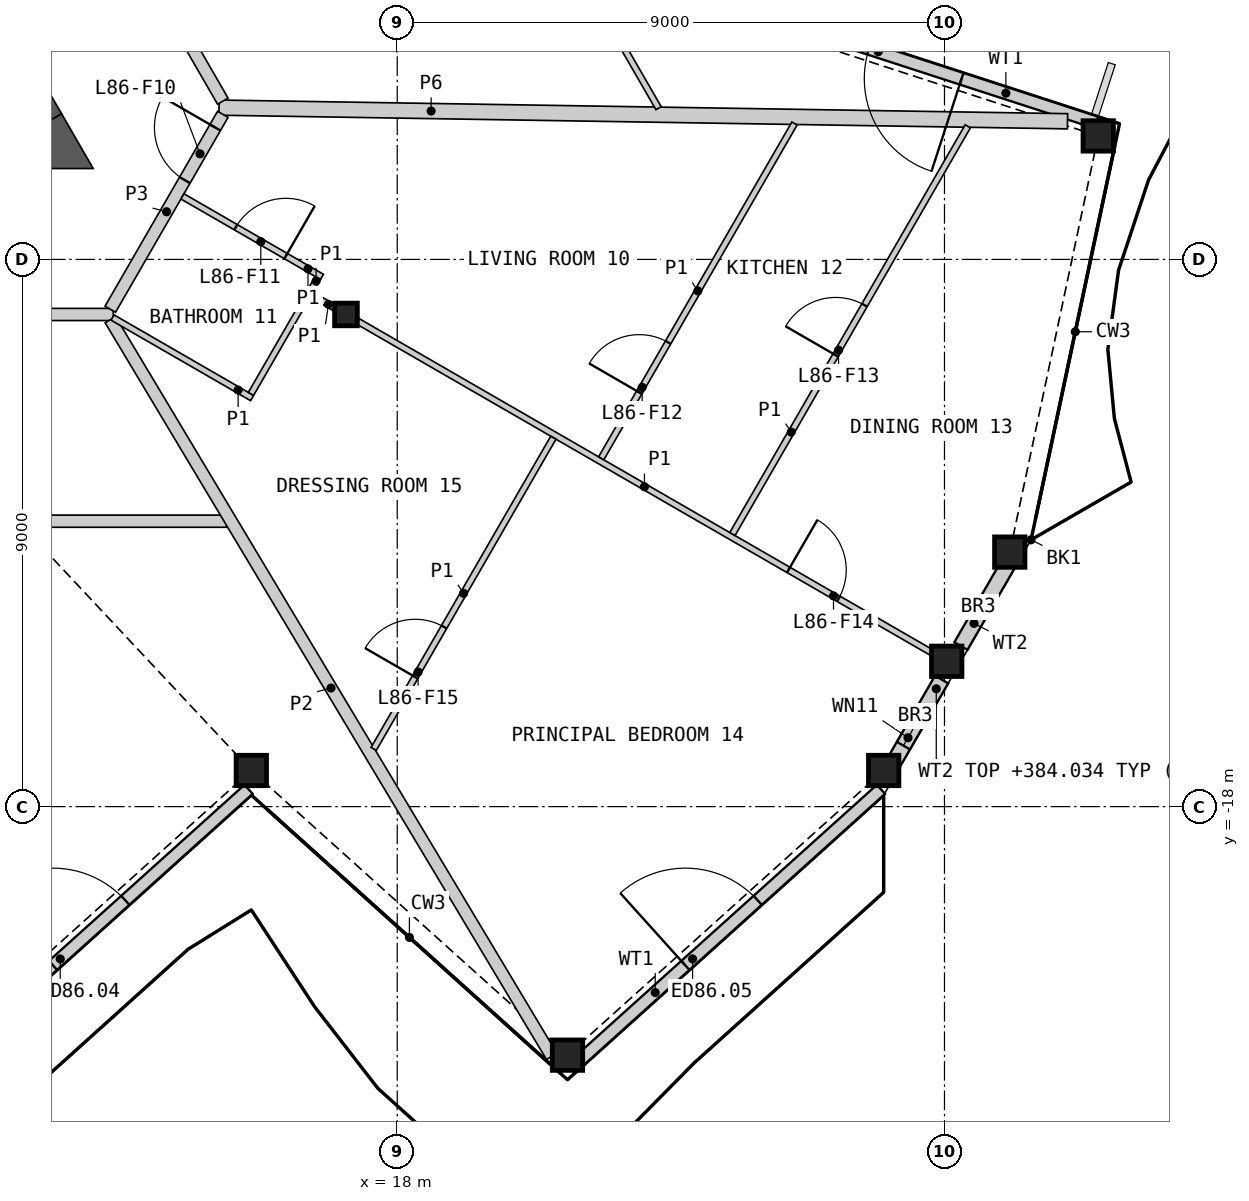
"""IFC4 building model, lengths in metres.
Left out: names, types, materials, properties, quantities, classifications, styles, units other than length and angle.
Written with IfcOpenShell. Run it as: python <this file> out.ifc"""

import sys

from ifc_helpers import new_model, si_unit, direction, frame, frame_2d, origin, origin_2d, place, context, subcontext, project, spatial, polyline, rectangle, hollow_rectangle, i_section, outline, extrude, element, fill, save


model = new_model("IFC4")
c1 = context("Model", 3, precision=1e-05, world=origin(), true_north=direction((0.0, 1.0)))
c2 = subcontext(c1, "Body", "Model", "MODEL_VIEW")
j1 = project(units=[si_unit("LENGTHUNIT", "METRE"), si_unit("PLANEANGLEUNIT", "RADIAN")], contexts=[c1])
p1 = place(None, origin())
s1 = spatial("IfcSite", under=j1, at=p1, CompositionType="ELEMENT")
p2 = place(p1, origin())
s2 = spatial("IfcBuilding", under=s1, at=p2, CompositionType="ELEMENT")
p3 = place(p2, frame((0.0, 0.0, 381.4)))
s3 = spatial("IfcBuildingStorey", under=s2, at=p3, CompositionType="ELEMENT", Elevation=381.4)
for number, where, z_axis, x_axis in (
    (1, (15.6, -17.406, 0.0), (0.0, 0.0, 1.0), (1.0, 0.0, 0.0)),
    (2, (20.8, -22.088, 0.0), (0.0, 0.0, 1.0), (1.0, 0.0, 0.0)),
    (3, (26.0, -17.406, 0.0), (0.0, 0.0, 1.0), (1.0, 0.0, 0.0)),
    (4, (27.037, -15.61, 0.0), (0.0, 0.0, 1.0), (1.0, 0.0, 0.0)),
    (5, (28.074, -13.814, 0.0), (0.0, 0.0, 1.0), (1.0, 0.0, 0.0)),
    (6, (29.529, -6.969, 0.0), (0.0, 0.0, 1.0), (1.0, 0.0, 0.0)),
):
    element("IfcColumn", number, at=place(p3, frame(where, z_axis=z_axis, x_axis=x_axis)), inside=s3, PredefinedType="COLUMN", context=c2, shape_type="SweptSolid", body=[
        extrude(hollow_rectangle(XDim=0.5, YDim=0.5, WallThickness=0.03, at=origin_2d()), origin(), (0.0, 0.0, 1.0), 3.4),
    ])
p4 = place(p3, frame((17.157, -9.906, 0.0), z_axis=(0.0, 0.0, 1.0), x_axis=(1.0, 0.0, 0.0)))
e7 = element("IfcColumn", 7, at=p4, inside=s3, PredefinedType="COLUMN", context=c2, shape_type="SweptSolid", body=[
    extrude(i_section(OverallWidth=0.374, OverallDepth=0.372, WebThickness=0.016, FlangeThickness=0.026, at=origin_2d()), origin(), (0.0, 0.0, 1.0), 3.4),
])
p5 = place(p3, frame((10.605, -22.173, 0.0), z_axis=(0.0, 0.0, 1.0), x_axis=(0.743135582201, 0.669140871915, 0.0)))
e8 = element("IfcWall", 8, at=p5, inside=s3, PredefinedType="SOLIDWALL", context=c2, shape_type="SweptSolid", body=[
    extrude(rectangle(XDim=6.662, YDim=0.2, at=frame_2d((3.331, 0.0))), origin(), (0.0, 0.0, 1.0), 2.634),
])
p6 = place(p5, frame((2.333, 0.0, 0.0)))
e9 = element("IfcOpeningElement", 9, at=p6, cuts=e8, PredefinedType="OPENING", context=c2, shape_type="SweptSolid", body=[
    extrude(rectangle(XDim=1.6, YDim=2.25, at=frame_2d((0.8, 1.125))), frame((0.0, 0.11, 0.0), z_axis=(0.0, -1.0, 0.0), x_axis=(1.0, 0.0, 0.0)), (0.0, 0.0, 1.0), 0.22),
])
p7 = place(p3, frame((21.005, -22.173, 0.0), z_axis=(0.0, 0.0, 1.0), x_axis=(0.743135582201, 0.669140871915, 0.0)))
e10 = element("IfcWall", 10, at=p7, inside=s3, PredefinedType="SOLIDWALL", context=c2, shape_type="SweptSolid", body=[
    extrude(rectangle(XDim=6.662, YDim=0.2, at=frame_2d((3.331, 0.0))), origin(), (0.0, 0.0, 1.0), 2.634),
])
p8 = place(p7, frame((2.333, 0.0, 0.0)))
e11 = element("IfcOpeningElement", 11, at=p8, cuts=e10, PredefinedType="OPENING", context=c2, shape_type="SweptSolid", body=[
    extrude(rectangle(XDim=1.6, YDim=2.25, at=frame_2d((0.8, 1.125))), frame((0.0, 0.11, 0.0), z_axis=(0.0, -1.0, 0.0), x_axis=(1.0, 0.0, 0.0)), (0.0, 0.0, 1.0), 0.22),
])
p9 = place(p3, frame((26.075, -17.43, 0.0), z_axis=(0.0, 0.0, 1.0), x_axis=(0.500027377864, 0.86600959659, 0.0)))
e12 = element("IfcWall", 12, at=p9, inside=s3, PredefinedType="SOLIDWALL", context=c2, shape_type="SweptSolid", body=[
    extrude(rectangle(XDim=1.756, YDim=0.25, at=frame_2d((0.878, 0.0))), origin(), (0.0, 0.0, 1.0), 2.634),
])
p10 = place(p9, frame((0.5, 0.0, 1.7)))
e13 = element("IfcOpeningElement", 13, at=p10, cuts=e12, PredefinedType="OPENING", context=c2, shape_type="SweptSolid", body=[
    extrude(rectangle(XDim=0.6, YDim=0.7, at=frame_2d((0.3, 0.35))), frame((0.0, 0.135, 0.0), z_axis=(0.0, -1.0, 0.0), x_axis=(1.0, 0.0, 0.0)), (0.0, 0.0, 1.0), 0.27),
])
p11 = place(p3, frame((27.27, -15.36, 0.0), z_axis=(0.0, 0.0, 1.0), x_axis=(0.499975693202, 0.866039436866, 0.0)))
e14 = element("IfcWall", 14, at=p11, inside=s3, PredefinedType="SOLIDWALL", context=c2, shape_type="SweptSolid", body=[
    extrude(rectangle(XDim=1.725, YDim=0.25, at=frame_2d((0.862, 0.0))), origin(), (0.0, 0.0, 1.0), 2.634),
])
p12 = place(p3, frame((29.5, -6.75, 0.0), z_axis=(0.0, 0.0, 1.0), x_axis=(-0.951060123915, 0.309005891041, 0.0)))
e15 = element("IfcWall", 15, at=p12, inside=s3, PredefinedType="SOLIDWALL", context=c2, shape_type="SweptSolid", body=[
    extrude(rectangle(XDim=6.265, YDim=0.2, at=frame_2d((3.133, 0.0))), origin(), (0.0, 0.0, 1.0), 2.634),
])
p13 = place(p12, frame((2.333, 0.0, 0.0)))
e16 = element("IfcOpeningElement", 16, at=p13, cuts=e15, PredefinedType="OPENING", context=c2, shape_type="SweptSolid", body=[
    extrude(rectangle(XDim=1.6, YDim=2.25, at=frame_2d((0.8, 1.125))), frame((0.0, 0.11, 0.0), z_axis=(0.0, -1.0, 0.0), x_axis=(1.0, 0.0, 0.0)), (0.0, 0.0, 1.0), 0.22),
])
p14 = place(p3, frame((12.221, -6.756, 0.0), z_axis=(0.0, 0.0, 1.0), x_axis=(-0.500020646047, 0.866013483456, 0.0)))
e17 = element("IfcWall", 17, at=p14, inside=s3, PredefinedType="SHEAR", context=c2, shape_type="SweptSolid", body=[
    extrude(rectangle(XDim=4.559, YDim=0.6, at=frame_2d((2.28, 0.0))), origin(), (0.0, 0.0, 1.0), 3.1),
])
p15 = place(p3, origin())
e18 = element("IfcWall", 18, at=p15, inside=s3, PredefinedType="SHEAR", context=c2, shape_type="SweptSolid", body=[
    extrude(outline(polyline([(11.961, -7.506), (11.961, -6.906), (12.48, -6.606), (13.0, -7.506), (11.961, -7.506)])), origin(), (0.0, 0.0, 1.0), 3.1),
])
p16 = place(p3, frame((15.069, -6.503, 0.0), z_axis=(0.0, 0.0, 1.0), x_axis=(0.999870484296, -0.016093931549, 0.0)))
e19 = element("IfcWall", 19, at=p16, inside=s3, PredefinedType="PARTITIONING", context=c2, shape_type="SweptSolid", body=[
    extrude(rectangle(XDim=13.956, YDim=0.25, at=frame_2d((6.978, 0.0))), origin(), (0.0, 0.0, 1.0), 2.33),
])
p17 = place(p3, frame((8.775, -9.906, 0.0), z_axis=(0.0, 0.0, 1.0), x_axis=(1.0, 0.0, 0.0)))
e20 = element("IfcWall", 20, at=p17, inside=s3, PredefinedType="PARTITIONING", context=c2, shape_type="SweptSolid", body=[
    extrude(rectangle(XDim=4.555, YDim=0.2, at=frame_2d((2.278, 0.0))), origin(), (0.0, 0.0, 1.0), 3.1),
])
p18 = place(p3, frame((12.981, -2.673, 0.0), z_axis=(0.0, 0.0, 1.0), x_axis=(0.499986217557, -0.866033360935, 0.0)))
e21 = element("IfcWall", 21, at=p18, inside=s3, PredefinedType="PARTITIONING", context=c2, shape_type="SweptSolid", body=[
    extrude(rectangle(XDim=4.3, YDim=0.2, at=frame_2d((2.15, 0.0))), origin(), (0.0, 0.0, 1.0), 3.1),
])
p19 = place(p3, frame((13.281, -9.819, 0.0), z_axis=(0.0, 0.0, 1.0), x_axis=(0.499948957823, 0.866054870994, 0.0)))
e22 = element("IfcWall", 22, at=p19, inside=s3, PredefinedType="PARTITIONING", context=c2, shape_type="SweptSolid", body=[
    extrude(rectangle(XDim=3.701, YDim=0.2, at=frame_2d((1.851, 0.0))), origin(), (0.0, 0.0, 1.0), 3.1),
])
p20 = place(p19, frame((2.451, 0.0, 0.0)))
e23 = element("IfcOpeningElement", 23, at=p20, cuts=e22, PredefinedType="OPENING", context=c2, shape_type="SweptSolid", body=[
    extrude(rectangle(XDim=1.0, YDim=2.1, at=frame_2d((0.5, 1.05))), frame((0.0, 0.11, 0.0), z_axis=(0.0, -1.0, 0.0), x_axis=(1.0, 0.0, 0.0)), (0.0, 0.0, 1.0), 0.22),
])
p21 = place(p3, frame((0.1, -13.306, 0.0), z_axis=(0.0, 0.0, 1.0), x_axis=(1.0, 0.0, 0.0)))
e24 = element("IfcWall", 24, at=p21, inside=s3, PredefinedType="PARTITIONING", context=c2, shape_type="SweptSolid", body=[
    extrude(rectangle(XDim=15.094, YDim=0.2, at=frame_2d((7.547, 0.0))), origin(), (0.0, 0.0, 1.0), 2.33),
])
p22 = place(p21, frame((9.781, 0.0, 0.0)))
e25 = element("IfcOpeningElement", 25, at=p22, cuts=e24, PredefinedType="OPENING", context=c2, shape_type="SweptSolid", body=[
    extrude(rectangle(XDim=0.95, YDim=2.1, at=frame_2d((0.475, 1.05))), frame((0.0, 0.11, 0.0), z_axis=(0.0, -1.0, 0.0), x_axis=(1.0, 0.0, 0.0)), (0.0, 0.0, 1.0), 0.22),
])
p23 = place(p3, frame((13.282, -9.991, 0.0), z_axis=(0.0, 0.0, 1.0), x_axis=(0.513867741763, -0.857869421285, 0.0)))
e26 = element("IfcWall", 26, at=p23, inside=s3, PredefinedType="PARTITIONING", context=c2, shape_type="SweptSolid", body=[
    extrude(rectangle(XDim=14.124, YDim=0.2, at=frame_2d((7.062, 0.0))), origin(), (0.0, 0.0, 1.0), 2.33),
])
p24 = place(p3, frame((17.354, -10.019, 0.0), z_axis=(0.0, 0.0, 1.0), x_axis=(0.866019680922, -0.500009912158, 0.0)))
e27 = element("IfcWall", 27, at=p24, inside=s3, PredefinedType="PARTITIONING", context=c2, shape_type="SweptSolid", body=[
    extrude(rectangle(XDim=10.881, YDim=0.1, at=frame_2d((5.44, 0.0))), origin(), (0.0, 0.0, 1.0), 2.33),
])
p25 = place(p24, frame((8.176, 0.0, 0.0)))
e28 = element("IfcOpeningElement", 28, at=p25, cuts=e27, PredefinedType="OPENING", context=c2, shape_type="SweptSolid", body=[
    extrude(rectangle(XDim=0.95, YDim=2.1, at=frame_2d((0.475, 1.05))), frame((0.0, 0.06, 0.0), z_axis=(0.0, -1.0, 0.0), x_axis=(1.0, 0.0, 0.0)), (0.0, 0.0, 1.0), 0.12),
])
p26 = place(p3, frame((23.512, -13.517, 0.0), z_axis=(0.0, 0.0, 1.0), x_axis=(0.49998445949, 0.866034375916, 0.0)))
e29 = element("IfcWall", 29, at=p26, inside=s3, PredefinedType="PARTITIONING", context=c2, shape_type="SweptSolid", body=[
    extrude(rectangle(XDim=7.743, YDim=0.1, at=frame_2d((3.872, 0.0))), origin(), (0.0, 0.0, 1.0), 2.33),
])
p27 = place(p26, frame((3.397, 0.0, 0.0)))
e30 = element("IfcOpeningElement", 30, at=p27, cuts=e29, PredefinedType="OPENING", context=c2, shape_type="SweptSolid", body=[
    extrude(rectangle(XDim=0.95, YDim=2.1, at=frame_2d((0.475, 1.05))), frame((0.0, 0.06, 0.0), z_axis=(0.0, -1.0, 0.0), x_axis=(1.0, 0.0, 0.0)), (0.0, 0.0, 1.0), 0.12),
])
p28 = place(p3, frame((21.354, -12.271, 0.0), z_axis=(0.0, 0.0, 1.0), x_axis=(0.499983931063, 0.866034680991, 0.0)))
e31 = element("IfcWall", 31, at=p28, inside=s3, PredefinedType="PARTITIONING", context=c2, shape_type="SweptSolid", body=[
    extrude(rectangle(XDim=6.358, YDim=0.1, at=frame_2d((3.179, 0.0))), origin(), (0.0, 0.0, 1.0), 2.33),
])
p29 = place(p28, frame((1.252, 0.0, 0.0)))
e32 = element("IfcOpeningElement", 32, at=p29, cuts=e31, PredefinedType="OPENING", context=c2, shape_type="SweptSolid", body=[
    extrude(rectangle(XDim=0.95, YDim=2.1, at=frame_2d((0.475, 1.05))), frame((0.0, 0.06, 0.0), z_axis=(0.0, -1.0, 0.0), x_axis=(1.0, 0.0, 0.0)), (0.0, 0.0, 1.0), 0.12),
])
p30 = place(p3, frame((19.128, -1.023, 0.0), z_axis=(0.0, 0.0, 1.0), x_axis=(0.499991387631, -0.866030376081, 0.0)))
e33 = element("IfcWall", 33, at=p30, inside=s3, PredefinedType="PARTITIONING", context=c2, shape_type="SweptSolid", body=[
    extrude(rectangle(XDim=6.339, YDim=0.1, at=frame_2d((3.169, 0.0))), origin(), (0.0, 0.0, 1.0), 2.33),
])
p31 = place(p30, frame((2.389, 0.0, 0.0)))
e34 = element("IfcOpeningElement", 34, at=p31, cuts=e33, PredefinedType="OPENING", context=c2, shape_type="SweptSolid", body=[
    extrude(rectangle(XDim=0.95, YDim=2.1, at=frame_2d((0.475, 1.05))), frame((0.0, 0.06, 0.0), z_axis=(0.0, -1.0, 0.0), x_axis=(1.0, 0.0, 0.0)), (0.0, 0.0, 1.0), 0.12),
])
p32 = place(p3, frame((17.613, -17.051, 0.0), z_axis=(0.0, 0.0, 1.0), x_axis=(0.499982307286, 0.866035618437, 0.0)))
e35 = element("IfcWall", 35, at=p32, inside=s3, PredefinedType="PARTITIONING", context=c2, shape_type="SweptSolid", body=[
    extrude(rectangle(XDim=5.91, YDim=0.1, at=frame_2d((2.955, 0.0))), origin(), (0.0, 0.0, 1.0), 2.33),
])
p33 = place(p32, frame((1.365, 0.0, 0.0)))
e36 = element("IfcOpeningElement", 36, at=p33, cuts=e35, PredefinedType="OPENING", context=c2, shape_type="SweptSolid", body=[
    extrude(rectangle(XDim=0.95, YDim=2.1, at=frame_2d((0.475, 1.05))), frame((0.0, 0.06, 0.0), z_axis=(0.0, -1.0, 0.0), x_axis=(1.0, 0.0, 0.0)), (0.0, 0.0, 1.0), 0.12),
])
p34 = place(p3, frame((13.317, -9.956, 0.0), z_axis=(0.0, 0.0, 1.0), x_axis=(0.866052124492, -0.499953715521, 0.0)))
e37 = element("IfcWall", 37, at=p34, inside=s3, PredefinedType="PARTITIONING", context=c2, shape_type="SweptSolid", body=[
    extrude(rectangle(XDim=2.65, YDim=0.1, at=frame_2d((1.325, 0.0))), origin(), (0.0, 0.0, 1.0), 2.33),
])
p35 = place(p3, frame((14.468, -7.964, 0.0), z_axis=(0.0, 0.0, 1.0), x_axis=(0.86603978909, -0.499975083092, 0.0)))
e38 = element("IfcWall", 38, at=p35, inside=s3, PredefinedType="PARTITIONING", context=c2, shape_type="SweptSolid", body=[
    extrude(rectangle(XDim=2.649, YDim=0.1, at=frame_2d((1.325, 0.0))), origin(), (0.0, 0.0, 1.0), 2.33),
])
p36 = place(p35, frame((1.013, 0.0, 0.0)))
e39 = element("IfcOpeningElement", 39, at=p36, cuts=e38, PredefinedType="OPENING", context=c2, shape_type="SweptSolid", body=[
    extrude(rectangle(XDim=0.95, YDim=2.1, at=frame_2d((0.475, 1.05))), frame((0.0, 0.06, 0.0), z_axis=(0.0, -1.0, 0.0), x_axis=(1.0, 0.0, 0.0)), (0.0, 0.0, 1.0), 0.12),
])
p37 = place(p3, frame((15.594, -11.212, 0.0), z_axis=(0.0, 0.0, 1.0), x_axis=(0.500011643316, 0.866018681408, 0.0)))
e40 = element("IfcWall", 40, at=p37, inside=s3, PredefinedType="PARTITIONING", context=c2, shape_type="SweptSolid", body=[
    extrude(rectangle(XDim=1.973, YDim=0.1, at=frame_2d((0.987, 0.0))), origin(), (0.0, 0.0, 1.0), 2.33),
])
p38 = place(p3, frame((16.594, -9.581, 0.0), z_axis=(0.0, 0.0, 1.0), x_axis=(0.866137484628, -0.499805820016, 0.0)))
e41 = element("IfcWall", 41, at=p38, inside=s3, PredefinedType="PARTITIONING", context=c2, shape_type="SweptSolid", body=[
    extrude(rectangle(XDim=0.423, YDim=0.1, at=frame_2d((0.211, 0.0))), origin(), (0.0, 0.0, 1.0), 2.33),
])
p39 = place(p3, frame((16.582, -9.501, 0.0), z_axis=(0.0, 0.0, 1.0), x_axis=(0.498246276801, 0.867035551551, 0.0)))
e42 = element("IfcWall", 42, at=p39, inside=s3, PredefinedType="PARTITIONING", context=c2, shape_type="SweptSolid", body=[
    extrude(rectangle(XDim=0.224, YDim=0.1, at=frame_2d((0.112, 0.0))), origin(), (0.0, 0.0, 1.0), 2.33),
])
p40 = place(p6, origin())
e43 = element("IfcDoor", 43, at=p40, inside=s3, OperationType="DOUBLE_DOOR_SINGLE_SWING", PredefinedType="DOOR", context=c2, shape_type="SweptSolid", body=[
    extrude(rectangle(XDim=1.6, YDim=2.25, at=frame_2d((0.8, 1.125))), frame((0.0, 0.025, 0.0), z_axis=(0.0, -1.0, 0.0), x_axis=(1.0, 0.0, 0.0)), (0.0, 0.0, 1.0), 0.05),
])
fill(e9, e43)
p41 = place(p8, origin())
e44 = element("IfcDoor", 44, at=p41, inside=s3, OperationType="DOUBLE_DOOR_SINGLE_SWING", PredefinedType="DOOR", context=c2, shape_type="SweptSolid", body=[
    extrude(rectangle(XDim=1.6, YDim=2.25, at=frame_2d((0.8, 1.125))), frame((0.0, 0.025, 0.0), z_axis=(0.0, -1.0, 0.0), x_axis=(1.0, 0.0, 0.0)), (0.0, 0.0, 1.0), 0.05),
])
fill(e11, e44)
p42 = place(p10, origin())
e45 = element("IfcWindow", 45, at=p42, inside=s3, PartitioningType="SINGLE_PANEL", PredefinedType="WINDOW", context=c2, shape_type="SweptSolid", body=[
    extrude(rectangle(XDim=0.6, YDim=0.7, at=frame_2d((0.3, 0.35))), frame((0.0, 0.03, 0.0), z_axis=(0.0, -1.0, 0.0), x_axis=(1.0, 0.0, 0.0)), (0.0, 0.0, 1.0), 0.06),
])
fill(e13, e45)
p43 = place(p13, origin())
e46 = element("IfcDoor", 46, at=p43, inside=s3, OperationType="DOUBLE_DOOR_SINGLE_SWING", PredefinedType="DOOR", context=c2, shape_type="SweptSolid", body=[
    extrude(rectangle(XDim=1.6, YDim=2.25, at=frame_2d((0.8, 1.125))), frame((0.0, 0.025, 0.0), z_axis=(0.0, -1.0, 0.0), x_axis=(1.0, 0.0, 0.0)), (0.0, 0.0, 1.0), 0.05),
])
fill(e16, e46)
p44 = place(p20, origin())
e47 = element("IfcDoor", 47, at=p44, inside=s3, OperationType="SINGLE_SWING_RIGHT", PredefinedType="DOOR", context=c2, shape_type="SweptSolid", body=[
    extrude(rectangle(XDim=1.0, YDim=2.1, at=frame_2d((0.5, 1.05))), frame((0.0, 0.025, 0.0), z_axis=(0.0, -1.0, 0.0), x_axis=(1.0, 0.0, 0.0)), (0.0, 0.0, 1.0), 0.05),
])
fill(e23, e47)
p45 = place(p36, origin())
e48 = element("IfcDoor", 48, at=p45, inside=s3, OperationType="SINGLE_SWING_RIGHT", PredefinedType="DOOR", context=c2, shape_type="SweptSolid", body=[
    extrude(rectangle(XDim=0.95, YDim=2.1, at=frame_2d((0.475, 1.05))), frame((0.0, 0.025, 0.0), z_axis=(0.0, -1.0, 0.0), x_axis=(1.0, 0.0, 0.0)), (0.0, 0.0, 1.0), 0.05),
])
fill(e39, e48)
p46 = place(p29, origin())
e49 = element("IfcDoor", 49, at=p46, inside=s3, OperationType="SINGLE_SWING_LEFT", PredefinedType="DOOR", context=c2, shape_type="SweptSolid", body=[
    extrude(rectangle(XDim=0.95, YDim=2.1, at=frame_2d((0.475, 1.05))), frame((0.0, 0.025, 0.0), z_axis=(0.0, -1.0, 0.0), x_axis=(1.0, 0.0, 0.0)), (0.0, 0.0, 1.0), 0.05),
])
fill(e32, e49)
p47 = place(p27, origin())
e50 = element("IfcDoor", 50, at=p47, inside=s3, OperationType="SINGLE_SWING_LEFT", PredefinedType="DOOR", context=c2, shape_type="SweptSolid", body=[
    extrude(rectangle(XDim=0.95, YDim=2.1, at=frame_2d((0.475, 1.05))), frame((0.0, 0.025, 0.0), z_axis=(0.0, -1.0, 0.0), x_axis=(1.0, 0.0, 0.0)), (0.0, 0.0, 1.0), 0.05),
])
fill(e30, e50)
p48 = place(p25, origin())
e51 = element("IfcDoor", 51, at=p48, inside=s3, OperationType="SINGLE_SWING_LEFT", PredefinedType="DOOR", context=c2, shape_type="SweptSolid", body=[
    extrude(rectangle(XDim=0.95, YDim=2.1, at=frame_2d((0.475, 1.05))), frame((0.0, 0.025, 0.0), z_axis=(0.0, -1.0, 0.0), x_axis=(1.0, 0.0, 0.0)), (0.0, 0.0, 1.0), 0.05),
])
fill(e28, e51)
p49 = place(p33, origin())
e52 = element("IfcDoor", 52, at=p49, inside=s3, OperationType="SINGLE_SWING_LEFT", PredefinedType="DOOR", context=c2, shape_type="SweptSolid", body=[
    extrude(rectangle(XDim=0.95, YDim=2.1, at=frame_2d((0.475, 1.05))), frame((0.0, 0.025, 0.0), z_axis=(0.0, -1.0, 0.0), x_axis=(1.0, 0.0, 0.0)), (0.0, 0.0, 1.0), 0.05),
])
fill(e36, e52)
save(model, sys.argv[1])
